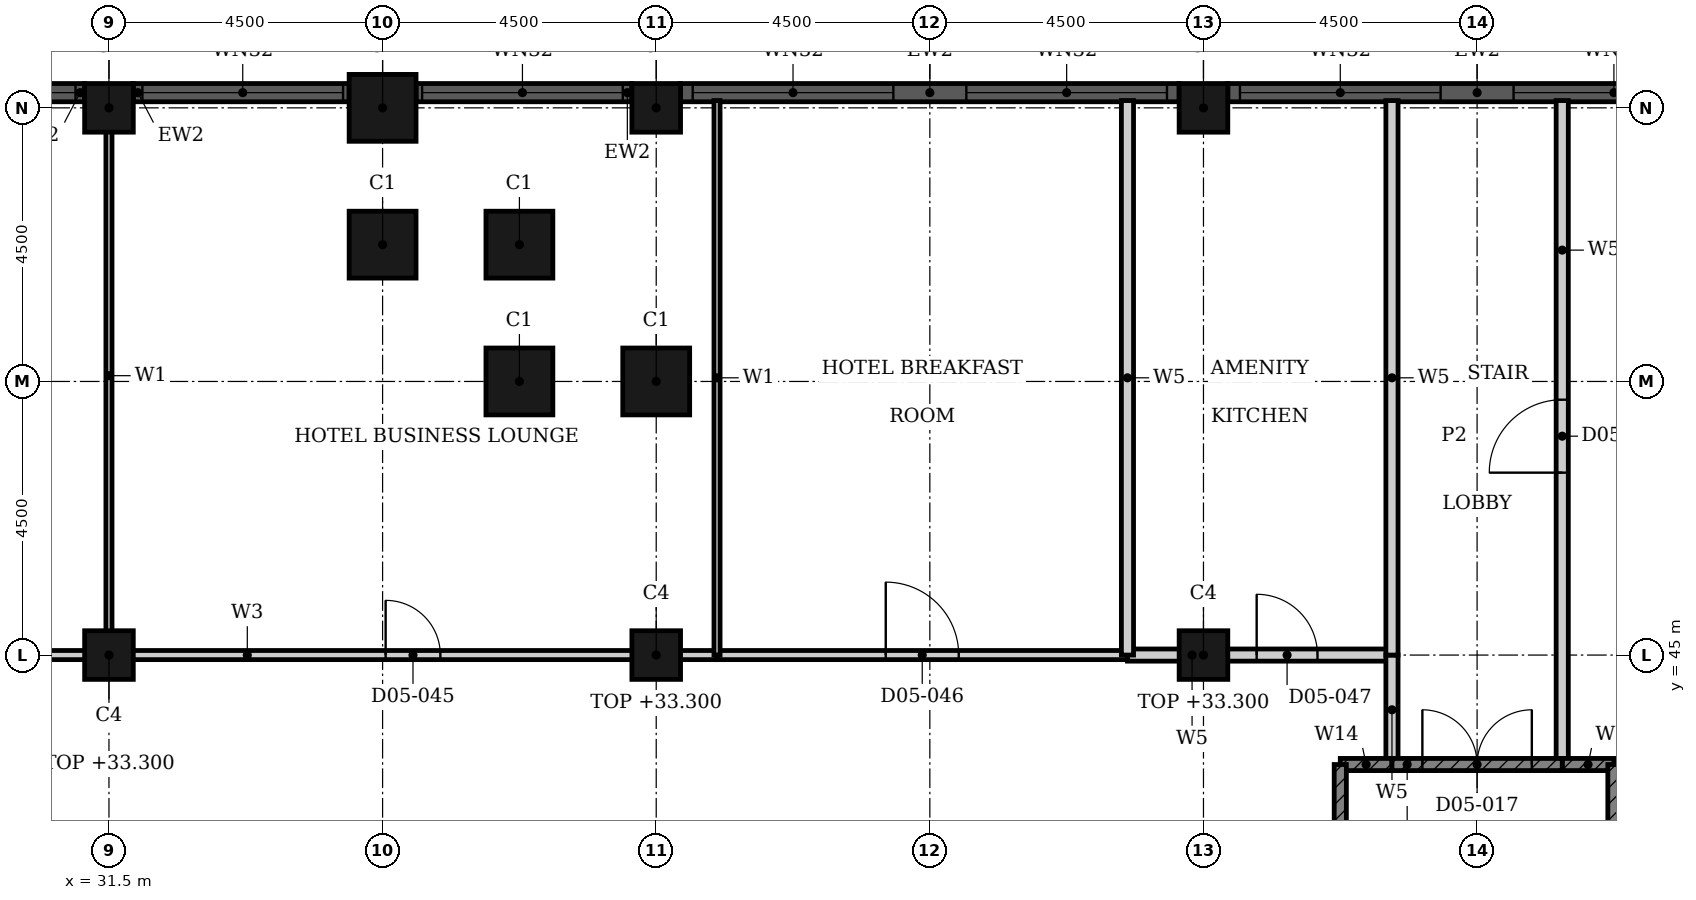
"""IFC4 building model, lengths in metres.
Left out: names, types, materials, properties, quantities, classifications, styles, units other than length and angle.
Written with IfcOpenShell. Run it as: python <this file> out.ifc"""

import sys

from ifc_helpers import new_model, si_unit, direction, frame, frame_2d, origin, origin_2d, place, context, subcontext, project, spatial, rectangle, hollow_rectangle, extrude, element, fill, save


model = new_model("IFC4")
c1 = context("Model", 3, precision=1e-05, world=origin(), true_north=direction((0.0, 1.0)))
c2 = subcontext(c1, "Body", "Model", "MODEL_VIEW")
j1 = project(units=[si_unit("LENGTHUNIT", "METRE"), si_unit("PLANEANGLEUNIT", "RADIAN")], contexts=[c1])
p1 = place(None, origin())
s1 = spatial("IfcSite", under=j1, at=p1, CompositionType="ELEMENT")
p2 = place(p1, origin())
s2 = spatial("IfcBuilding", under=s1, at=p2, CompositionType="ELEMENT")
p3 = place(p2, frame((0.0, 0.0, 28.8)))
s3 = spatial("IfcBuildingStorey", under=s2, at=p3, CompositionType="ELEMENT", Elevation=28.8)
for number, where, z_axis, x_axis in (
    (1, (40.5, 49.5, 0.0), (0.0, 0.0, 1.0), (1.0, 0.0, 0.0)),
    (2, (38.25, 49.5, 0.0), (0.0, 0.0, 1.0), (1.0, 0.0, 0.0)),
    (3, (38.25, 51.75, 0.0), (0.0, 0.0, 1.0), (1.0, 0.0, 0.0)),
    (4, (36.0, 51.75, 0.0), (0.0, 0.0, 1.0), (1.0, 0.0, 0.0)),
    (5, (36.0, 54.0, 0.0), (0.0, 0.0, 1.0), (1.0, 0.0, 0.0)),
):
    element("IfcColumn", number, at=place(p3, frame(where, z_axis=z_axis, x_axis=x_axis)), inside=s3, PredefinedType="COLUMN", context=c2, shape_type="SweptSolid", body=[
        extrude(hollow_rectangle(XDim=1.1, YDim=1.1, WallThickness=0.036, at=origin_2d()), origin(), (0.0, 0.0, 1.0), 4.8),
    ])
for number, where, z_axis, x_axis in (
    (6, (31.5, 54.0, 0.0), (0.0, 0.0, 1.0), (1.0, 0.0, 0.0)),
    (7, (40.5, 54.0, 0.0), (0.0, 0.0, 1.0), (1.0, 0.0, 0.0)),
    (8, (49.5, 54.0, 0.0), (0.0, 0.0, 1.0), (1.0, 0.0, 0.0)),
    (9, (31.5, 45.0, 0.0), (0.0, 0.0, 1.0), (1.0, 0.0, 0.0)),
    (10, (40.5, 45.0, 0.0), (0.0, 0.0, 1.0), (1.0, 0.0, 0.0)),
    (11, (49.5, 45.0, 0.0), (0.0, 0.0, 1.0), (1.0, 0.0, 0.0)),
):
    element("IfcColumn", number, at=place(p3, frame(where, z_axis=z_axis, x_axis=x_axis)), inside=s3, PredefinedType="COLUMN", context=c2, shape_type="SweptSolid", body=[
        extrude(hollow_rectangle(XDim=0.8, YDim=0.8, WallThickness=0.025, at=origin_2d()), origin(), (0.0, 0.0, 1.0), 4.5),
    ])
p4 = place(p3, frame((58.1, 54.25, 0.0), z_axis=(0.0, 0.0, 1.0), x_axis=(-1.0, 0.0, 0.0)))
e12 = element("IfcWall", 12, at=p4, inside=s3, PredefinedType="SOLIDWALL", context=c2, shape_type="SweptSolid", body=[
    extrude(rectangle(XDim=8.2, YDim=0.3, at=frame_2d((4.1, 0.0))), origin(), (0.0, 0.0, 1.0), 4.8),
])
p5 = place(p4, frame((0.2, 0.0, 0.9)))
e13 = element("IfcOpeningElement", 13, at=p5, cuts=e12, PredefinedType="OPENING", context=c2, shape_type="SweptSolid", body=[
    extrude(rectangle(XDim=3.3, YDim=2.9, at=frame_2d((1.65, 1.45))), frame((0.0, 0.16, 0.0), z_axis=(0.0, -1.0, 0.0), x_axis=(1.0, 0.0, 0.0)), (0.0, 0.0, 1.0), 0.32),
])
p6 = place(p4, frame((4.7, 0.0, 0.9)))
e14 = element("IfcOpeningElement", 14, at=p6, cuts=e12, PredefinedType="OPENING", context=c2, shape_type="SweptSolid", body=[
    extrude(rectangle(XDim=3.3, YDim=2.9, at=frame_2d((1.65, 1.45))), frame((0.0, 0.16, 0.0), z_axis=(0.0, -1.0, 0.0), x_axis=(1.0, 0.0, 0.0)), (0.0, 0.0, 1.0), 0.32),
])
p7 = place(p3, frame((49.1, 54.25, 0.0), z_axis=(0.0, 0.0, 1.0), x_axis=(-1.0, 0.0, 0.0)))
e15 = element("IfcWall", 15, at=p7, inside=s3, PredefinedType="SOLIDWALL", context=c2, shape_type="SweptSolid", body=[
    extrude(rectangle(XDim=8.2, YDim=0.3, at=frame_2d((4.1, 0.0))), origin(), (0.0, 0.0, 1.0), 4.8),
])
p8 = place(p7, frame((0.2, 0.0, 0.9)))
e16 = element("IfcOpeningElement", 16, at=p8, cuts=e15, PredefinedType="OPENING", context=c2, shape_type="SweptSolid", body=[
    extrude(rectangle(XDim=3.3, YDim=2.9, at=frame_2d((1.65, 1.45))), frame((0.0, 0.16, 0.0), z_axis=(0.0, -1.0, 0.0), x_axis=(1.0, 0.0, 0.0)), (0.0, 0.0, 1.0), 0.32),
])
p9 = place(p7, frame((4.7, 0.0, 0.9)))
e17 = element("IfcOpeningElement", 17, at=p9, cuts=e15, PredefinedType="OPENING", context=c2, shape_type="SweptSolid", body=[
    extrude(rectangle(XDim=3.3, YDim=2.9, at=frame_2d((1.65, 1.45))), frame((0.0, 0.16, 0.0), z_axis=(0.0, -1.0, 0.0), x_axis=(1.0, 0.0, 0.0)), (0.0, 0.0, 1.0), 0.32),
])
p10 = place(p3, frame((40.1, 54.25, 0.0), z_axis=(0.0, 0.0, 1.0), x_axis=(-1.0, 0.0, 0.0)))
e18 = element("IfcWall", 18, at=p10, inside=s3, PredefinedType="SOLIDWALL", context=c2, shape_type="SweptSolid", body=[
    extrude(rectangle(XDim=3.55, YDim=0.3, at=frame_2d((1.775, 0.0))), origin(), (0.0, 0.0, 1.0), 4.8),
])
p11 = place(p10, frame((0.15, 0.0, 0.9)))
e19 = element("IfcOpeningElement", 19, at=p11, cuts=e18, PredefinedType="OPENING", context=c2, shape_type="SweptSolid", body=[
    extrude(rectangle(XDim=3.3, YDim=2.9, at=frame_2d((1.65, 1.45))), frame((0.0, 0.16, 0.0), z_axis=(0.0, -1.0, 0.0), x_axis=(1.0, 0.0, 0.0)), (0.0, 0.0, 1.0), 0.32),
])
p12 = place(p3, frame((35.45, 54.25, 0.0), z_axis=(0.0, 0.0, 1.0), x_axis=(-1.0, 0.0, 0.0)))
e20 = element("IfcWall", 20, at=p12, inside=s3, PredefinedType="SOLIDWALL", context=c2, shape_type="SweptSolid", body=[
    extrude(rectangle(XDim=3.55, YDim=0.3, at=frame_2d((1.775, 0.0))), origin(), (0.0, 0.0, 1.0), 4.8),
])
p13 = place(p12, frame((0.1, 0.0, 0.9)))
e21 = element("IfcOpeningElement", 21, at=p13, cuts=e20, PredefinedType="OPENING", context=c2, shape_type="SweptSolid", body=[
    extrude(rectangle(XDim=3.3, YDim=2.9, at=frame_2d((1.65, 1.45))), frame((0.0, 0.16, 0.0), z_axis=(0.0, -1.0, 0.0), x_axis=(1.0, 0.0, 0.0)), (0.0, 0.0, 1.0), 0.32),
])
p14 = place(p3, frame((31.1, 54.25, 0.0), z_axis=(0.0, 0.0, 1.0), x_axis=(-1.0, 0.0, 0.0)))
e22 = element("IfcWall", 22, at=p14, inside=s3, PredefinedType="SOLIDWALL", context=c2, shape_type="SweptSolid", body=[
    extrude(rectangle(XDim=3.55, YDim=0.3, at=frame_2d((1.775, 0.0))), origin(), (0.0, 0.0, 1.0), 4.8),
])
p15 = place(p14, frame((0.15, 0.0, 0.9)))
e23 = element("IfcOpeningElement", 23, at=p15, cuts=e22, PredefinedType="OPENING", context=c2, shape_type="SweptSolid", body=[
    extrude(rectangle(XDim=3.3, YDim=2.9, at=frame_2d((1.65, 1.45))), frame((0.0, 0.16, 0.0), z_axis=(0.0, -1.0, 0.0), x_axis=(1.0, 0.0, 0.0)), (0.0, 0.0, 1.0), 0.32),
])
p16 = place(p3, frame((24.75, 45.0, 0.0), z_axis=(0.0, 0.0, 1.0), x_axis=(1.0, 0.0, 0.0)))
e24 = element("IfcWall", 24, at=p16, inside=s3, PredefinedType="PARTITIONING", context=c2, shape_type="SweptSolid", body=[
    extrude(rectangle(XDim=6.75, YDim=0.15, at=frame_2d((3.375, 0.0))), origin(), (0.0, 0.0, 1.0), 4.5),
])
p17 = place(p16, frame((2.775, 0.0, 0.0)))
e25 = element("IfcOpeningElement", 25, at=p17, cuts=e24, PredefinedType="OPENING", context=c2, shape_type="SweptSolid", body=[
    extrude(rectangle(XDim=1.2, YDim=2.4, at=frame_2d((0.6, 1.2))), frame((0.0, 0.085, 0.0), z_axis=(0.0, -1.0, 0.0), x_axis=(1.0, 0.0, 0.0)), (0.0, 0.0, 1.0), 0.17),
])
p18 = place(p3, frame((31.5, 45.0, 0.0), z_axis=(0.0, 0.0, 1.0), x_axis=(1.0, 0.0, 0.0)))
e26 = element("IfcWall", 26, at=p18, inside=s3, PredefinedType="PARTITIONING", context=c2, shape_type="SweptSolid", body=[
    extrude(rectangle(XDim=10.0, YDim=0.15, at=frame_2d((5.0, 0.0))), origin(), (0.0, 0.0, 1.0), 4.5),
])
p19 = place(p18, frame((4.55, 0.0, 0.0)))
e27 = element("IfcOpeningElement", 27, at=p19, cuts=e26, PredefinedType="OPENING", context=c2, shape_type="SweptSolid", body=[
    extrude(rectangle(XDim=0.9, YDim=2.1, at=frame_2d((0.45, 1.05))), frame((0.0, 0.085, 0.0), z_axis=(0.0, -1.0, 0.0), x_axis=(1.0, 0.0, 0.0)), (0.0, 0.0, 1.0), 0.17),
])
p20 = place(p3, frame((41.5, 45.0, 0.0), z_axis=(0.0, 0.0, 1.0), x_axis=(1.0, 0.0, 0.0)))
e28 = element("IfcWall", 28, at=p20, inside=s3, PredefinedType="PARTITIONING", context=c2, shape_type="SweptSolid", body=[
    extrude(rectangle(XDim=6.75, YDim=0.15, at=frame_2d((3.375, 0.0))), origin(), (0.0, 0.0, 1.0), 4.5),
])
p21 = place(p20, frame((2.775, 0.0, 0.0)))
e29 = element("IfcOpeningElement", 29, at=p21, cuts=e28, PredefinedType="OPENING", context=c2, shape_type="SweptSolid", body=[
    extrude(rectangle(XDim=1.2, YDim=2.4, at=frame_2d((0.6, 1.2))), frame((0.0, 0.085, 0.0), z_axis=(0.0, -1.0, 0.0), x_axis=(1.0, 0.0, 0.0)), (0.0, 0.0, 1.0), 0.17),
])
p22 = place(p3, frame((31.5, 45.0, 0.0), z_axis=(0.0, 0.0, 1.0), x_axis=(0.0, 1.0, 0.0)))
e30 = element("IfcWall", 30, at=p22, inside=s3, PredefinedType="PARTITIONING", context=c2, shape_type="SweptSolid", body=[
    extrude(rectangle(XDim=9.19, YDim=0.1, at=frame_2d((4.595, 0.0))), origin(), (0.0, 0.0, 1.0), 3.78),
])
p23 = place(p3, frame((41.5, 45.0, 0.0), z_axis=(0.0, 0.0, 1.0), x_axis=(0.0, 1.0, 0.0)))
e31 = element("IfcWall", 31, at=p23, inside=s3, PredefinedType="PARTITIONING", context=c2, shape_type="SweptSolid", body=[
    extrude(rectangle(XDim=9.12, YDim=0.1, at=frame_2d((4.56, 0.0))), origin(), (0.0, 0.0, 1.0), 4.5),
])
p24 = place(p3, frame((48.25, 45.0, 0.0), z_axis=(0.0, 0.0, 1.0), x_axis=(1.0, 0.0, 0.0)))
e32 = element("IfcWall", 32, at=p24, inside=s3, PredefinedType="PARTITIONING", context=c2, shape_type="SweptSolid", body=[
    extrude(rectangle(XDim=4.35, YDim=0.2, at=frame_2d((2.175, 0.0))), origin(), (0.0, 0.0, 1.0), 4.5),
])
p25 = place(p24, frame((2.125, 0.0, 0.0)))
e33 = element("IfcOpeningElement", 33, at=p25, cuts=e32, PredefinedType="OPENING", context=c2, shape_type="SweptSolid", body=[
    extrude(rectangle(XDim=1.0, YDim=2.1, at=frame_2d((0.5, 1.05))), frame((0.0, 0.11, 0.0), z_axis=(0.0, -1.0, 0.0), x_axis=(1.0, 0.0, 0.0)), (0.0, 0.0, 1.0), 0.22),
])
p26 = place(p3, frame((48.25, 45.0, 0.0), z_axis=(0.0, 0.0, 1.0), x_axis=(0.0, 1.0, 0.0)))
e34 = element("IfcWall", 34, at=p26, inside=s3, PredefinedType="PARTITIONING", context=c2, shape_type="SweptSolid", body=[
    extrude(rectangle(XDim=9.12, YDim=0.2, at=frame_2d((4.56, 0.0))), origin(), (0.0, 0.0, 1.0), 4.5),
])
p27 = place(p3, frame((52.6, 43.2, 0.0), z_axis=(0.0, 0.0, 1.0), x_axis=(0.0, 1.0, 0.0)))
e35 = element("IfcWall", 35, at=p27, inside=s3, PredefinedType="PARTITIONING", context=c2, shape_type="SweptSolid", body=[
    extrude(rectangle(XDim=1.8, YDim=0.2, at=frame_2d((0.9, 0.0))), origin(), (0.0, 0.0, 1.0), 4.5),
])
p28 = place(p3, frame((52.6, 45.0, 0.0), z_axis=(0.0, 0.0, 1.0), x_axis=(0.0, 1.0, 0.0)))
e36 = element("IfcWall", 36, at=p28, inside=s3, PredefinedType="PARTITIONING", context=c2, shape_type="SweptSolid", body=[
    extrude(rectangle(XDim=9.12, YDim=0.2, at=frame_2d((4.56, 0.0))), origin(), (0.0, 0.0, 1.0), 4.5),
])
p29 = place(p3, frame((55.4, 43.2, 0.0), z_axis=(0.0, 0.0, 1.0), x_axis=(0.0, 1.0, 0.0)))
e37 = element("IfcWall", 37, at=p29, inside=s3, PredefinedType="PARTITIONING", context=c2, shape_type="SweptSolid", body=[
    extrude(rectangle(XDim=10.92, YDim=0.2, at=frame_2d((5.46, 0.0))), origin(), (0.0, 0.0, 1.0), 4.5),
])
p30 = place(p29, frame((4.8, 0.0, 0.0)))
e38 = element("IfcOpeningElement", 38, at=p30, cuts=e37, PredefinedType="OPENING", context=c2, shape_type="SweptSolid", body=[
    extrude(rectangle(XDim=1.2, YDim=2.1, at=frame_2d((0.6, 1.05))), frame((0.0, 0.11, 0.0), z_axis=(0.0, -1.0, 0.0), x_axis=(1.0, 0.0, 0.0)), (0.0, 0.0, 1.0), 0.22),
])
for number, where, z_axis, x_axis in (
    (39, (51.75, 43.2, 0.0), (0.0, 0.0, 1.0), (1.0, 0.0, 0.0)),
    (40, (55.4, 43.2, 0.0), (0.0, 0.0, 1.0), (1.0, 0.0, 0.0)),
):
    element("IfcWall", number, at=place(p3, frame(where, z_axis=z_axis, x_axis=x_axis)), inside=s3, PredefinedType="SHEAR", context=c2, shape_type="SweptSolid", body=[
        extrude(rectangle(XDim=0.85, YDim=0.2, at=frame_2d((0.425, 0.0))), origin(), (0.0, 0.0, 1.0), 4.5),
    ])
p31 = place(p3, frame((52.6, 43.2, 0.0), z_axis=(0.0, 0.0, 1.0), x_axis=(1.0, 0.0, 0.0)))
e41 = element("IfcWall", 41, at=p31, inside=s3, PredefinedType="SHEAR", context=c2, shape_type="SweptSolid", body=[
    extrude(rectangle(XDim=2.8, YDim=0.2, at=frame_2d((1.4, 0.0))), origin(), (0.0, 0.0, 1.0), 4.5),
])
p32 = place(p31, frame((0.5, 0.0, 0.0)))
e42 = element("IfcOpeningElement", 42, at=p32, cuts=e41, PredefinedType="OPENING", context=c2, shape_type="SweptSolid", body=[
    extrude(rectangle(XDim=1.8, YDim=2.1, at=frame_2d((0.9, 1.05))), frame((0.0, 0.11, 0.0), z_axis=(0.0, -1.0, 0.0), x_axis=(1.0, 0.0, 0.0)), (0.0, 0.0, 1.0), 0.22),
])
p33 = place(p3, frame((51.75, 40.5, 0.0), z_axis=(0.0, 0.0, 1.0), x_axis=(0.0, 1.0, 0.0)))
e43 = element("IfcWall", 43, at=p33, inside=s3, PredefinedType="SHEAR", context=c2, shape_type="SweptSolid", body=[
    extrude(rectangle(XDim=2.7, YDim=0.2, at=frame_2d((1.35, 0.0))), origin(), (0.0, 0.0, 1.0), 4.5),
])
p34 = place(p3, frame((56.25, 34.75, 0.0), z_axis=(0.0, 0.0, 1.0), x_axis=(0.0, 1.0, 0.0)))
e44 = element("IfcWall", 44, at=p34, inside=s3, PredefinedType="SHEAR", context=c2, shape_type="SweptSolid", body=[
    extrude(rectangle(XDim=8.45, YDim=0.2, at=frame_2d((4.225, 0.0))), origin(), (0.0, 0.0, 1.0), 4.5),
])
p35 = place(p5, origin())
e45 = element("IfcWindow", 45, at=p35, inside=s3, PartitioningType="SINGLE_PANEL", PredefinedType="WINDOW", context=c2, shape_type="SweptSolid", body=[
    extrude(rectangle(XDim=3.3, YDim=2.9, at=frame_2d((1.65, 1.45))), frame((0.0, 0.03, 0.0), z_axis=(0.0, -1.0, 0.0), x_axis=(1.0, 0.0, 0.0)), (0.0, 0.0, 1.0), 0.06),
])
fill(e13, e45)
p36 = place(p6, origin())
e46 = element("IfcWindow", 46, at=p36, inside=s3, PartitioningType="SINGLE_PANEL", PredefinedType="WINDOW", context=c2, shape_type="SweptSolid", body=[
    extrude(rectangle(XDim=3.3, YDim=2.9, at=frame_2d((1.65, 1.45))), frame((0.0, 0.03, 0.0), z_axis=(0.0, -1.0, 0.0), x_axis=(1.0, 0.0, 0.0)), (0.0, 0.0, 1.0), 0.06),
])
fill(e14, e46)
p37 = place(p8, origin())
e47 = element("IfcWindow", 47, at=p37, inside=s3, PartitioningType="SINGLE_PANEL", PredefinedType="WINDOW", context=c2, shape_type="SweptSolid", body=[
    extrude(rectangle(XDim=3.3, YDim=2.9, at=frame_2d((1.65, 1.45))), frame((0.0, 0.03, 0.0), z_axis=(0.0, -1.0, 0.0), x_axis=(1.0, 0.0, 0.0)), (0.0, 0.0, 1.0), 0.06),
])
fill(e16, e47)
p38 = place(p9, origin())
e48 = element("IfcWindow", 48, at=p38, inside=s3, PartitioningType="SINGLE_PANEL", PredefinedType="WINDOW", context=c2, shape_type="SweptSolid", body=[
    extrude(rectangle(XDim=3.3, YDim=2.9, at=frame_2d((1.65, 1.45))), frame((0.0, 0.03, 0.0), z_axis=(0.0, -1.0, 0.0), x_axis=(1.0, 0.0, 0.0)), (0.0, 0.0, 1.0), 0.06),
])
fill(e17, e48)
p39 = place(p11, origin())
e49 = element("IfcWindow", 49, at=p39, inside=s3, PartitioningType="SINGLE_PANEL", PredefinedType="WINDOW", context=c2, shape_type="SweptSolid", body=[
    extrude(rectangle(XDim=3.3, YDim=2.9, at=frame_2d((1.65, 1.45))), frame((0.0, 0.03, 0.0), z_axis=(0.0, -1.0, 0.0), x_axis=(1.0, 0.0, 0.0)), (0.0, 0.0, 1.0), 0.06),
])
fill(e19, e49)
p40 = place(p13, origin())
e50 = element("IfcWindow", 50, at=p40, inside=s3, PartitioningType="SINGLE_PANEL", PredefinedType="WINDOW", context=c2, shape_type="SweptSolid", body=[
    extrude(rectangle(XDim=3.3, YDim=2.9, at=frame_2d((1.65, 1.45))), frame((0.0, 0.03, 0.0), z_axis=(0.0, -1.0, 0.0), x_axis=(1.0, 0.0, 0.0)), (0.0, 0.0, 1.0), 0.06),
])
fill(e21, e50)
p41 = place(p15, origin())
e51 = element("IfcWindow", 51, at=p41, inside=s3, PartitioningType="SINGLE_PANEL", PredefinedType="WINDOW", context=c2, shape_type="SweptSolid", body=[
    extrude(rectangle(XDim=3.3, YDim=2.9, at=frame_2d((1.65, 1.45))), frame((0.0, 0.03, 0.0), z_axis=(0.0, -1.0, 0.0), x_axis=(1.0, 0.0, 0.0)), (0.0, 0.0, 1.0), 0.06),
])
fill(e23, e51)
p42 = place(p30, origin())
e52 = element("IfcDoor", 52, at=p42, inside=s3, OperationType="SINGLE_SWING_LEFT", PredefinedType="DOOR", context=c2, shape_type="SweptSolid", body=[
    extrude(rectangle(XDim=1.2, YDim=2.1, at=frame_2d((0.6, 1.05))), frame((0.0, 0.025, 0.0), z_axis=(0.0, -1.0, 0.0), x_axis=(1.0, 0.0, 0.0)), (0.0, 0.0, 1.0), 0.05),
])
fill(e38, e52)
p43 = place(p32, origin())
e53 = element("IfcDoor", 53, at=p43, inside=s3, OperationType="DOUBLE_DOOR_SINGLE_SWING", PredefinedType="DOOR", context=c2, shape_type="SweptSolid", body=[
    extrude(rectangle(XDim=1.8, YDim=2.1, at=frame_2d((0.9, 1.05))), frame((0.0, 0.025, 0.0), z_axis=(0.0, -1.0, 0.0), x_axis=(1.0, 0.0, 0.0)), (0.0, 0.0, 1.0), 0.05),
])
fill(e42, e53)
p44 = place(p19, origin())
e54 = element("IfcDoor", 54, at=p44, inside=s3, OperationType="SINGLE_SWING_RIGHT", PredefinedType="DOOR", context=c2, shape_type="SweptSolid", body=[
    extrude(rectangle(XDim=0.9, YDim=2.1, at=frame_2d((0.45, 1.05))), frame((0.0, 0.025, 0.0), z_axis=(0.0, -1.0, 0.0), x_axis=(1.0, 0.0, 0.0)), (0.0, 0.0, 1.0), 0.05),
])
fill(e27, e54)
p45 = place(p21, origin())
e55 = element("IfcDoor", 55, at=p45, inside=s3, OperationType="SINGLE_SWING_RIGHT", PredefinedType="DOOR", context=c2, shape_type="SweptSolid", body=[
    extrude(rectangle(XDim=1.2, YDim=2.4, at=frame_2d((0.6, 1.2))), frame((0.0, 0.025, 0.0), z_axis=(0.0, -1.0, 0.0), x_axis=(1.0, 0.0, 0.0)), (0.0, 0.0, 1.0), 0.05),
])
fill(e29, e55)
p46 = place(p25, origin())
e56 = element("IfcDoor", 56, at=p46, inside=s3, OperationType="SINGLE_SWING_RIGHT", PredefinedType="DOOR", context=c2, shape_type="SweptSolid", body=[
    extrude(rectangle(XDim=1.0, YDim=2.1, at=frame_2d((0.5, 1.05))), frame((0.0, 0.025, 0.0), z_axis=(0.0, -1.0, 0.0), x_axis=(1.0, 0.0, 0.0)), (0.0, 0.0, 1.0), 0.05),
])
fill(e33, e56)
save(model, sys.argv[1])
